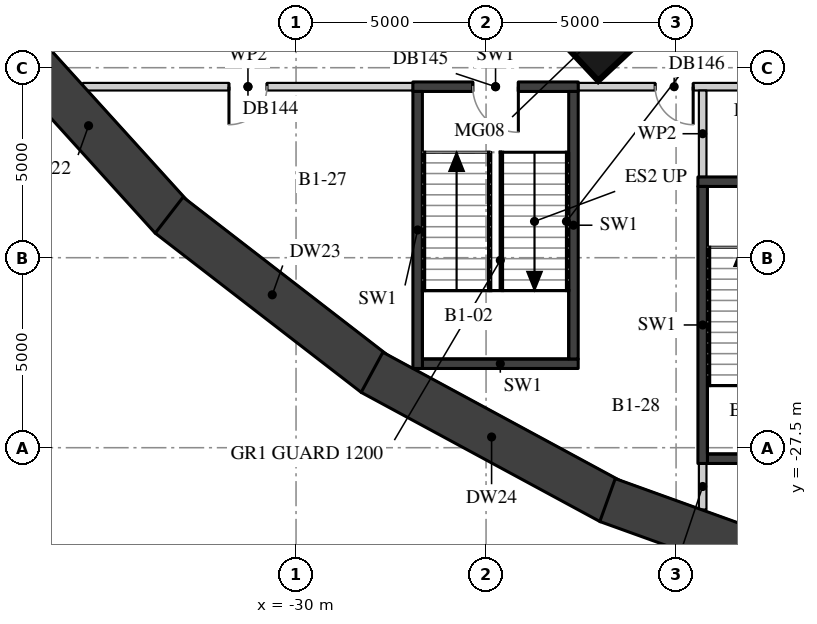
"""IFC4 building model, lengths in metres.
Left out: names, types, materials, properties, quantities, classifications, styles, units other than length and angle.
Written with IfcOpenShell. Run it as: python <this file> out.ifc"""

import sys

from ifc_helpers import new_model, si_unit, direction, frame, frame_2d, origin, origin_2d, place, context, subcontext, project, spatial, rectangle, extrude, element, fill, save


model = new_model("IFC4")
c1 = context("Model", 3, precision=1e-05, world=origin(), true_north=direction((0.0, 1.0)))
c2 = subcontext(c1, "Body", "Model", "MODEL_VIEW")
j1 = project(units=[si_unit("LENGTHUNIT", "METRE"), si_unit("PLANEANGLEUNIT", "RADIAN")], contexts=[c1])
p1 = place(None, origin())
s1 = spatial("IfcSite", under=j1, at=p1, CompositionType="ELEMENT")
p2 = place(p1, origin())
s2 = spatial("IfcBuilding", under=s1, at=p2, CompositionType="ELEMENT")
p3 = place(p2, frame((0.0, 0.0, -5.2)))
s3 = spatial("IfcBuildingStorey", under=s2, at=p3, CompositionType="ELEMENT", Elevation=-5.2)
p4 = place(p3, frame((-37.657, -16.601, 0.0), z_axis=(0.0, 0.0, 1.0), x_axis=(0.671487423502, -0.741015951299, 0.0)))
e1 = element("IfcWall", 1, at=p4, inside=s3, PredefinedType="USERDEFINED", context=c2, shape_type="SweptSolid", body=[
    extrude(rectangle(XDim=6.545, YDim=1.2, at=frame_2d((3.272, 0.0))), origin(), (0.0, 0.0, 1.0), 5.2),
])
p5 = place(p3, frame((-33.339, -21.38, 0.0), z_axis=(0.0, 0.0, 1.0), x_axis=(0.791286567459, -0.611445474396, 0.0)))
e2 = element("IfcWall", 2, at=p5, inside=s3, PredefinedType="USERDEFINED", context=c2, shape_type="SweptSolid", body=[
    extrude(rectangle(XDim=6.857, YDim=1.2, at=frame_2d((3.428, 0.0))), origin(), (0.0, 0.0, 1.0), 5.2),
])
p6 = place(p3, frame((-28.0, -25.516, 0.0), z_axis=(0.0, 0.0, 1.0), x_axis=(0.879519330959, -0.475863159394, 0.0)))
e3 = element("IfcWall", 3, at=p6, inside=s3, PredefinedType="USERDEFINED", context=c2, shape_type="SweptSolid", body=[
    extrude(rectangle(XDim=7.155, YDim=1.2, at=frame_2d((3.577, 0.0))), origin(), (0.0, 0.0, 1.0), 5.2),
])
p7 = place(p3, frame((-21.803, -28.878, 0.0), z_axis=(0.0, 0.0, 1.0), x_axis=(0.940789454531, -0.338991448628, 0.0)))
e4 = element("IfcWall", 4, at=p7, inside=s3, PredefinedType="USERDEFINED", context=c2, shape_type="SweptSolid", body=[
    extrude(rectangle(XDim=7.406, YDim=1.2, at=frame_2d((3.703, 0.0))), origin(), (0.0, 0.0, 1.0), 5.2),
])
p8 = place(p3, frame((-21.641, -16.23, 0.0), z_axis=(0.0, 0.0, 1.0), x_axis=(-0.730113022917, -0.683326403535, 0.0)))
e5 = element("IfcColumn", 5, at=p8, inside=s3, PredefinedType="COLUMN", context=c2, shape_type="SweptSolid", body=[
    extrude(rectangle(XDim=2.8, YDim=1.8, at=origin_2d()), origin(), (0.0, 0.0, 1.0), 5.2),
])
for number, where, z_axis, x_axis in (
    (6, (-19.175, -27.79, 0.0), (0.0, 0.0, 1.0), (1.0, 0.0, 0.0)),
    (7, (-26.675, -25.29, 0.0), (0.0, 0.0, 1.0), (1.0, 0.0, 0.0)),
):
    element("IfcWall", number, at=place(p3, frame(where, z_axis=z_axis, x_axis=x_axis)), inside=s3, PredefinedType="SOLIDWALL", context=c2, shape_type="SweptSolid", body=[
        extrude(rectangle(XDim=4.1, YDim=0.25, at=frame_2d((2.05, 0.0))), origin(), (0.0, 0.0, 1.0), 4.79),
    ])
p9 = place(p3, frame((-19.425, -20.5, 0.0), z_axis=(0.0, 0.0, 1.0), x_axis=(1.0, 0.0, 0.0)))
e8 = element("IfcWall", 8, at=p9, inside=s3, PredefinedType="SOLIDWALL", context=c2, shape_type="SweptSolid", body=[
    extrude(rectangle(XDim=4.35, YDim=0.25, at=frame_2d((2.175, 0.0))), origin(), (0.0, 0.0, 1.0), 4.79),
])
p10 = place(p9, frame((1.575, 0.0, 0.0)))
e9 = element("IfcOpeningElement", 9, at=p10, cuts=e8, PredefinedType="OPENING", context=c2, shape_type="SweptSolid", body=[
    extrude(rectangle(XDim=1.2, YDim=2.1, at=frame_2d((0.6, 1.05))), frame((0.0, 0.135, 0.0), z_axis=(0.0, -1.0, 0.0), x_axis=(1.0, 0.0, 0.0)), (0.0, 0.0, 1.0), 0.27),
])
p11 = place(p3, frame((-35.605, -18.0, 0.0), z_axis=(0.0, 0.0, 1.0), x_axis=(1.0, 0.0, 0.0)))
e10 = element("IfcWall", 10, at=p11, inside=s3, PredefinedType="PARTITIONING", context=c2, shape_type="SweptSolid", body=[
    extrude(rectangle(XDim=8.68, YDim=0.2, at=frame_2d((4.34, 0.0))), origin(), (0.0, 0.0, 1.0), 4.79),
])
p12 = place(p11, frame((3.84, 0.0, 0.0)))
e11 = element("IfcOpeningElement", 11, at=p12, cuts=e10, PredefinedType="OPENING", context=c2, shape_type="SweptSolid", body=[
    extrude(rectangle(XDim=1.0, YDim=2.1, at=frame_2d((0.5, 1.05))), frame((0.0, 0.11, 0.0), z_axis=(0.0, -1.0, 0.0), x_axis=(1.0, 0.0, 0.0)), (0.0, 0.0, 1.0), 0.22),
])
p13 = place(p3, frame((-26.925, -18.0, 0.0), z_axis=(0.0, 0.0, 1.0), x_axis=(1.0, 0.0, 0.0)))
e12 = element("IfcWall", 12, at=p13, inside=s3, PredefinedType="SOLIDWALL", context=c2, shape_type="SweptSolid", body=[
    extrude(rectangle(XDim=4.35, YDim=0.25, at=frame_2d((2.175, 0.0))), origin(), (0.0, 0.0, 1.0), 4.79),
])
p14 = place(p13, frame((1.575, 0.0, 0.0)))
e13 = element("IfcOpeningElement", 13, at=p14, cuts=e12, PredefinedType="OPENING", context=c2, shape_type="SweptSolid", body=[
    extrude(rectangle(XDim=1.2, YDim=2.1, at=frame_2d((0.6, 1.05))), frame((0.0, 0.135, 0.0), z_axis=(0.0, -1.0, 0.0), x_axis=(1.0, 0.0, 0.0)), (0.0, 0.0, 1.0), 0.27),
])
p15 = place(p3, frame((-22.575, -18.0, 0.0), z_axis=(0.0, 0.0, 1.0), x_axis=(1.0, 0.0, 0.0)))
e14 = element("IfcWall", 14, at=p15, inside=s3, PredefinedType="PARTITIONING", context=c2, shape_type="SweptSolid", body=[
    extrude(rectangle(XDim=40.29, YDim=0.2, at=frame_2d((20.145, 0.0))), origin(), (0.0, 0.0, 1.0), 4.79),
])
p16 = place(p15, frame((2.025, 0.0, 0.0)))
e15 = element("IfcOpeningElement", 15, at=p16, cuts=e14, PredefinedType="OPENING", context=c2, shape_type="SweptSolid", body=[
    extrude(rectangle(XDim=1.0, YDim=2.1, at=frame_2d((0.5, 1.05))), frame((0.0, 0.11, 0.0), z_axis=(0.0, -1.0, 0.0), x_axis=(1.0, 0.0, 0.0)), (0.0, 0.0, 1.0), 0.22),
])
p17 = place(p15, frame((4.725, 0.0, 0.0)))
e16 = element("IfcOpeningElement", 16, at=p17, cuts=e14, PredefinedType="OPENING", context=c2, shape_type="SweptSolid", body=[
    extrude(rectangle(XDim=1.2, YDim=2.1, at=frame_2d((0.6, 1.05))), frame((0.0, 0.11, 0.0), z_axis=(0.0, -1.0, 0.0), x_axis=(1.0, 0.0, 0.0)), (0.0, 0.0, 1.0), 0.22),
])
p18 = place(p15, frame((19.425, 0.0, 0.0)))
e17 = element("IfcOpeningElement", 17, at=p18, cuts=e14, PredefinedType="OPENING", context=c2, shape_type="SweptSolid", body=[
    extrude(rectangle(XDim=1.8, YDim=2.1, at=frame_2d((0.9, 1.05))), frame((0.0, 0.11, 0.0), z_axis=(0.0, -1.0, 0.0), x_axis=(1.0, 0.0, 0.0)), (0.0, 0.0, 1.0), 0.22),
])
p19 = place(p15, frame((34.725, 0.0, 0.0)))
e18 = element("IfcOpeningElement", 18, at=p19, cuts=e14, PredefinedType="OPENING", context=c2, shape_type="SweptSolid", body=[
    extrude(rectangle(XDim=1.2, YDim=2.1, at=frame_2d((0.6, 1.05))), frame((0.0, 0.11, 0.0), z_axis=(0.0, -1.0, 0.0), x_axis=(1.0, 0.0, 0.0)), (0.0, 0.0, 1.0), 0.22),
])
p20 = place(p15, frame((37.882, 0.0, 0.0)))
e19 = element("IfcOpeningElement", 19, at=p20, cuts=e14, PredefinedType="OPENING", context=c2, shape_type="SweptSolid", body=[
    extrude(rectangle(XDim=1.0, YDim=2.1, at=frame_2d((0.5, 1.05))), frame((0.0, 0.11, 0.0), z_axis=(0.0, -1.0, 0.0), x_axis=(1.0, 0.0, 0.0)), (0.0, 0.0, 1.0), 0.22),
])
p21 = place(p3, frame((-26.8, -25.415, 0.0), z_axis=(0.0, 0.0, 1.0), x_axis=(0.0, 1.0, 0.0)))
e20 = element("IfcWall", 20, at=p21, inside=s3, PredefinedType="SOLIDWALL", context=c2, shape_type="SweptSolid", body=[
    extrude(rectangle(XDim=7.29, YDim=0.25, at=frame_2d((3.645, 0.0))), origin(), (0.0, 0.0, 1.0), 4.79),
])
p22 = place(p3, frame((-22.7, -25.165, 0.0), z_axis=(0.0, 0.0, 1.0), x_axis=(0.0, 1.0, 0.0)))
e21 = element("IfcWall", 21, at=p22, inside=s3, PredefinedType="SOLIDWALL", context=c2, shape_type="SweptSolid", body=[
    extrude(rectangle(XDim=7.04, YDim=0.25, at=frame_2d((3.52, 0.0))), origin(), (0.0, 0.0, 1.0), 4.79),
])
p23 = place(p3, frame((-19.3, -29.127, 0.0), z_axis=(0.0, 0.0, 1.0), x_axis=(0.0, 1.0, 0.0)))
e22 = element("IfcWall", 22, at=p23, inside=s3, PredefinedType="PARTITIONING", context=c2, shape_type="SweptSolid", body=[
    extrude(rectangle(XDim=1.212, YDim=0.2, at=frame_2d((0.606, 0.0))), origin(), (0.0, 0.0, 1.0), 4.79),
])
p24 = place(p3, frame((-19.3, -27.915, 0.0), z_axis=(0.0, 0.0, 1.0), x_axis=(0.0, 1.0, 0.0)))
e23 = element("IfcWall", 23, at=p24, inside=s3, PredefinedType="SOLIDWALL", context=c2, shape_type="SweptSolid", body=[
    extrude(rectangle(XDim=7.29, YDim=0.25, at=frame_2d((3.645, 0.0))), origin(), (0.0, 0.0, 1.0), 4.79),
])
p25 = place(p3, frame((-19.3, -20.375, 0.0), z_axis=(0.0, 0.0, 1.0), x_axis=(0.0, 1.0, 0.0)))
e24 = element("IfcWall", 24, at=p25, inside=s3, PredefinedType="PARTITIONING", context=c2, shape_type="SweptSolid", body=[
    extrude(rectangle(XDim=2.275, YDim=0.2, at=frame_2d((1.137, 0.0))), origin(), (0.0, 0.0, 1.0), 4.79),
])
p26 = place(p14, origin())
e25 = element("IfcDoor", 25, at=p26, inside=s3, OperationType="SINGLE_SWING_LEFT", PredefinedType="DOOR", context=c2, shape_type="SweptSolid", body=[
    extrude(rectangle(XDim=1.2, YDim=2.1, at=frame_2d((0.6, 1.05))), frame((0.0, 0.025, 0.0), z_axis=(0.0, -1.0, 0.0), x_axis=(1.0, 0.0, 0.0)), (0.0, 0.0, 1.0), 0.05),
])
fill(e13, e25)
p27 = place(p12, origin())
e26 = element("IfcDoor", 26, at=p27, inside=s3, OperationType="SINGLE_SWING_RIGHT", PredefinedType="DOOR", context=c2, shape_type="SweptSolid", body=[
    extrude(rectangle(XDim=1.0, YDim=2.1, at=frame_2d((0.5, 1.05))), frame((0.0, 0.025, 0.0), z_axis=(0.0, -1.0, 0.0), x_axis=(1.0, 0.0, 0.0)), (0.0, 0.0, 1.0), 0.05),
])
fill(e11, e26)
p28 = place(p16, origin())
e27 = element("IfcDoor", 27, at=p28, inside=s3, OperationType="SINGLE_SWING_LEFT", PredefinedType="DOOR", context=c2, shape_type="SweptSolid", body=[
    extrude(rectangle(XDim=1.0, YDim=2.1, at=frame_2d((0.5, 1.05))), frame((0.0, 0.025, 0.0), z_axis=(0.0, -1.0, 0.0), x_axis=(1.0, 0.0, 0.0)), (0.0, 0.0, 1.0), 0.05),
])
fill(e15, e27)
save(model, sys.argv[1])
